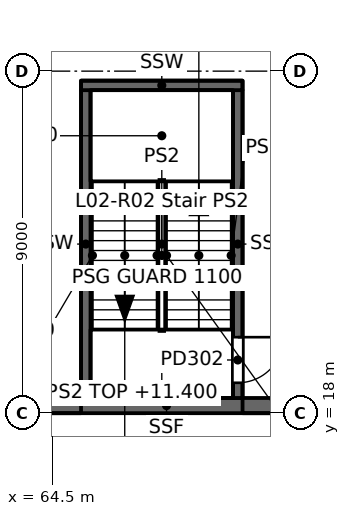
"""IFC4 building model, lengths in metres.
Left out: names, types, materials, properties, quantities, classifications, styles, units other than length and angle.
Written with IfcOpenShell. Run it as: python <this file> out.ifc"""

import sys

from ifc_helpers import new_model, si_unit, direction, frame, frame_2d, origin, place, context, subcontext, project, spatial, rectangle, extrude, element, fill, save


model = new_model("IFC4")
c1 = context("Model", 3, precision=1e-05, world=origin(), true_north=direction((0.0, 1.0)))
c2 = subcontext(c1, "Body", "Model", "MODEL_VIEW")
j1 = project(units=[si_unit("LENGTHUNIT", "METRE"), si_unit("PLANEANGLEUNIT", "RADIAN")], contexts=[c1])
p1 = place(None, origin())
s1 = spatial("IfcSite", under=j1, at=p1, CompositionType="ELEMENT")
p2 = place(p1, origin())
s2 = spatial("IfcBuilding", under=s1, at=p2, CompositionType="ELEMENT")
p3 = place(p2, frame((0.0, 0.0, 11.4)))
s3 = spatial("IfcBuildingStorey", under=s2, at=p3, CompositionType="ELEMENT", Elevation=11.4)
p4 = place(p3, frame((65.375, 18.4, 0.0), z_axis=(0.0, 0.0, 1.0), x_axis=(0.0, 1.0, 0.0)))
e1 = element("IfcWall", 1, at=p4, inside=s3, PredefinedType="SOLIDWALL", context=c2, shape_type="SweptSolid", body=[
    extrude(rectangle(XDim=8.1, YDim=0.25, at=frame_2d((4.05, 0.0))), origin(), (0.0, 0.0, 1.0), 5.4),
])
p5 = place(p3, frame((69.375, 26.5, 0.0), z_axis=(0.0, 0.0, 1.0), x_axis=(0.0, -1.0, 0.0)))
e2 = element("IfcWall", 2, at=p5, inside=s3, PredefinedType="SOLIDWALL", context=c2, shape_type="SweptSolid", body=[
    extrude(rectangle(XDim=8.1, YDim=0.25, at=frame_2d((4.05, 0.0))), origin(), (0.0, 0.0, 1.0), 5.4),
])
p6 = place(p5, frame((6.5, 0.0, 0.0)))
e3 = element("IfcOpeningElement", 3, at=p6, cuts=e2, PredefinedType="OPENING", context=c2, shape_type="SweptSolid", body=[
    extrude(rectangle(XDim=1.2, YDim=2.1, at=frame_2d((0.6, 1.05))), frame((0.0, 0.125, 0.0), z_axis=(0.0, -1.0, 0.0), x_axis=(1.0, 0.0, 0.0)), (0.0, 0.0, 1.0), 0.25),
])
p7 = place(p3, frame((65.25, 26.625, 0.0), z_axis=(0.0, 0.0, 1.0), x_axis=(1.0, 0.0, 0.0)))
e4 = element("IfcWall", 4, at=p7, inside=s3, PredefinedType="SOLIDWALL", context=c2, shape_type="SweptSolid", body=[
    extrude(rectangle(XDim=4.25, YDim=0.25, at=frame_2d((2.125, 0.0))), origin(), (0.0, 0.0, 1.0), 5.4),
])
p8 = place(p3, frame((71.25, 18.2, 0.0), z_axis=(0.0, 0.0, 1.0), x_axis=(-1.0, 0.0, 0.0)))
e5 = element("IfcWall", 5, at=p8, inside=s3, PredefinedType="SOLIDWALL", context=c2, shape_type="SweptSolid", body=[
    extrude(rectangle(XDim=7.5, YDim=0.4, at=frame_2d((3.75, 0.0))), origin(), (0.0, 0.0, 1.0), 5.05),
])
p9 = place(p6, origin())
e6 = element("IfcDoor", 6, at=p9, inside=s3, OperationType="SINGLE_SWING_LEFT", PredefinedType="DOOR", context=c2, shape_type="SweptSolid", body=[
    extrude(rectangle(XDim=1.2, YDim=2.1, at=frame_2d((0.6, 1.05))), frame((0.0, 0.025, 0.0), z_axis=(0.0, -1.0, 0.0), x_axis=(1.0, 0.0, 0.0)), (0.0, 0.0, 1.0), 0.05),
])
fill(e3, e6)
save(model, sys.argv[1])
